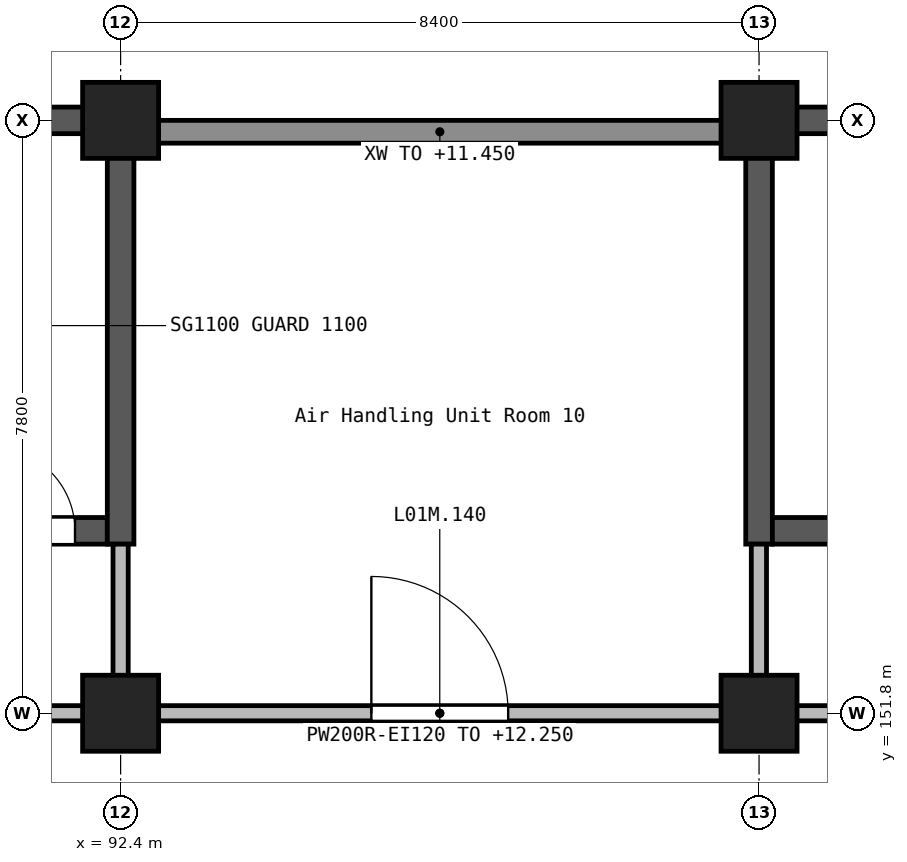
"""IFC4 building model, lengths in metres.
Left out: names, types, materials, properties, quantities, classifications, styles, units other than length and angle.
Written with IfcOpenShell. Run it as: python <this file> out.ifc"""

import sys

from ifc_helpers import new_model, si_unit, direction, frame, frame_2d, origin, origin_2d, place, context, subcontext, project, spatial, rectangle, extrude, element, fill, save


model = new_model("IFC4")
c1 = context("Model", 3, precision=1e-05, world=origin(), true_north=direction((0.0, 1.0)))
c2 = subcontext(c1, "Body", "Model", "MODEL_VIEW")
j1 = project(units=[si_unit("LENGTHUNIT", "METRE"), si_unit("PLANEANGLEUNIT", "RADIAN")], contexts=[c1])
p1 = place(None, origin())
s1 = spatial("IfcSite", under=j1, at=p1, CompositionType="ELEMENT")
p2 = place(p1, origin())
s2 = spatial("IfcBuilding", under=s1, at=p2, CompositionType="ELEMENT")
p3 = place(p2, frame((0.0, 0.0, 9.9)))
s3 = spatial("IfcBuildingStorey", under=s2, at=p3, CompositionType="ELEMENT", Elevation=9.9)
for number, where, z_axis, x_axis in (
    (1, (92.4, 151.8, 0.0), (0.0, 0.0, 1.0), (1.0, 0.0, 0.0)),
    (2, (92.4, 159.6, 0.0), (0.0, 0.0, 1.0), (1.0, 0.0, 0.0)),
    (3, (100.8, 151.8, 0.0), (0.0, 0.0, 1.0), (1.0, 0.0, 0.0)),
    (4, (100.8, 159.6, 0.0), (0.0, 0.0, 1.0), (1.0, 0.0, 0.0)),
):
    element("IfcColumn", number, at=place(p3, frame(where, z_axis=z_axis, x_axis=x_axis)), inside=s3, PredefinedType="COLUMN", context=c2, shape_type="SweptSolid", body=[
        extrude(rectangle(XDim=1.0, YDim=1.0, at=origin_2d()), origin(), (0.0, 0.0, 1.0), 2.7),
    ])
p4 = place(p3, frame((83.825, 159.6, 0.0), z_axis=(0.0, 0.0, 1.0), x_axis=(1.0, 0.0, 0.0)))
e5 = element("IfcWall", 5, at=p4, inside=s3, PredefinedType="SHEAR", context=c2, shape_type="SweptSolid", body=[
    extrude(rectangle(XDim=8.4, YDim=0.35, at=frame_2d((4.2, 0.0))), origin(), (0.0, 0.0, 1.0), 2.7),
])
p5 = place(p3, frame((84.175, 154.2, 0.0), z_axis=(0.0, 0.0, 1.0), x_axis=(1.0, 0.0, 0.0)))
e6 = element("IfcWall", 6, at=p5, inside=s3, PredefinedType="SHEAR", context=c2, shape_type="SweptSolid", body=[
    extrude(rectangle(XDim=8.05, YDim=0.35, at=frame_2d((4.025, 0.0))), origin(), (0.0, 0.0, 1.0), 2.7),
])
p6 = place(p5, frame((6.525, 0.0, 0.0)))
e7 = element("IfcOpeningElement", 7, at=p6, cuts=e6, PredefinedType="OPENING", context=c2, shape_type="SweptSolid", body=[
    extrude(rectangle(XDim=1.1, YDim=2.1, at=frame_2d((0.55, 1.05))), frame((0.0, 0.185, 0.0), z_axis=(0.0, -1.0, 0.0), x_axis=(1.0, 0.0, 0.0)), (0.0, 0.0, 1.0), 0.37),
])
p7 = place(p3, frame((92.4, 154.025, 0.0), z_axis=(0.0, 0.0, 1.0), x_axis=(0.0, 1.0, 0.0)))
e8 = element("IfcWall", 8, at=p7, inside=s3, PredefinedType="SHEAR", context=c2, shape_type="SweptSolid", body=[
    extrude(rectangle(XDim=5.75, YDim=0.35, at=frame_2d((2.875, 0.0))), origin(), (0.0, 0.0, 1.0), 2.7),
])
p8 = place(p3, frame((100.625, 159.6, 0.0), z_axis=(0.0, 0.0, 1.0), x_axis=(1.0, 0.0, 0.0)))
e9 = element("IfcWall", 9, at=p8, inside=s3, PredefinedType="SHEAR", context=c2, shape_type="SweptSolid", body=[
    extrude(rectangle(XDim=8.4, YDim=0.35, at=frame_2d((4.2, 0.0))), origin(), (0.0, 0.0, 1.0), 2.7),
])
p9 = place(p3, frame((100.8, 154.025, 0.0), z_axis=(0.0, 0.0, 1.0), x_axis=(0.0, 1.0, 0.0)))
e10 = element("IfcWall", 10, at=p9, inside=s3, PredefinedType="SHEAR", context=c2, shape_type="SweptSolid", body=[
    extrude(rectangle(XDim=5.4, YDim=0.35, at=frame_2d((2.7, 0.0))), origin(), (0.0, 0.0, 1.0), 2.7),
])
p10 = place(p3, frame((100.975, 154.2, 0.0), z_axis=(0.0, 0.0, 1.0), x_axis=(1.0, 0.0, 0.0)))
e11 = element("IfcWall", 11, at=p10, inside=s3, PredefinedType="SHEAR", context=c2, shape_type="SweptSolid", body=[
    extrude(rectangle(XDim=8.05, YDim=0.35, at=frame_2d((4.025, 0.0))), origin(), (0.0, 0.0, 1.0), 2.7),
])
p11 = place(p10, frame((6.525, 0.0, 0.0)))
e12 = element("IfcOpeningElement", 12, at=p11, cuts=e11, PredefinedType="OPENING", context=c2, shape_type="SweptSolid", body=[
    extrude(rectangle(XDim=1.1, YDim=2.1, at=frame_2d((0.55, 1.05))), frame((0.0, 0.185, 0.0), z_axis=(0.0, -1.0, 0.0), x_axis=(1.0, 0.0, 0.0)), (0.0, 0.0, 1.0), 0.37),
])
p12 = place(p3, frame((100.35, 159.45, 0.0), z_axis=(0.0, 0.0, 1.0), x_axis=(-1.0, 0.0, 0.0)))
e13 = element("IfcWall", 13, at=p12, inside=s3, PredefinedType="STANDARD", context=c2, shape_type="SweptSolid", body=[
    extrude(rectangle(XDim=7.5, YDim=0.3, at=frame_2d((3.75, 0.0))), origin(), (0.0, 0.0, 1.0), 1.55),
])
p13 = place(p3, frame((108.75, 151.8, 0.0), z_axis=(0.0, 0.0, 1.0), x_axis=(-1.0, 0.0, 0.0)))
e14 = element("IfcWall", 14, at=p13, inside=s3, PredefinedType="SOLIDWALL", context=c2, shape_type="SweptSolid", body=[
    extrude(rectangle(XDim=7.5, YDim=0.2, at=frame_2d((3.75, 0.0))), origin(), (0.0, 0.0, 1.0), 2.35),
])
p14 = place(p13, frame((3.2, 0.0, 0.0)))
e15 = element("IfcOpeningElement", 15, at=p14, cuts=e14, PredefinedType="OPENING", context=c2, shape_type="SweptSolid", body=[
    extrude(rectangle(XDim=1.1, YDim=2.1, at=frame_2d((0.55, 1.05))), frame((0.0, 0.11, 0.0), z_axis=(0.0, -1.0, 0.0), x_axis=(1.0, 0.0, 0.0)), (0.0, 0.0, 1.0), 0.22),
])
p15 = place(p3, frame((84.45, 151.8, 0.0), z_axis=(0.0, 0.0, 1.0), x_axis=(1.0, 0.0, 0.0)))
e16 = element("IfcWall", 16, at=p15, inside=s3, PredefinedType="SOLIDWALL", context=c2, shape_type="SweptSolid", body=[
    extrude(rectangle(XDim=7.5, YDim=0.2, at=frame_2d((3.75, 0.0))), origin(), (0.0, 0.0, 1.0), 2.35),
])
p16 = place(p15, frame((3.2, 0.0, 0.0)))
e17 = element("IfcOpeningElement", 17, at=p16, cuts=e16, PredefinedType="OPENING", context=c2, shape_type="SweptSolid", body=[
    extrude(rectangle(XDim=1.1, YDim=2.1, at=frame_2d((0.55, 1.05))), frame((0.0, 0.11, 0.0), z_axis=(0.0, -1.0, 0.0), x_axis=(1.0, 0.0, 0.0)), (0.0, 0.0, 1.0), 0.22),
])
p17 = place(p3, frame((92.85, 151.8, 0.0), z_axis=(0.0, 0.0, 1.0), x_axis=(1.0, 0.0, 0.0)))
e18 = element("IfcWall", 18, at=p17, inside=s3, PredefinedType="SOLIDWALL", context=c2, shape_type="SweptSolid", body=[
    extrude(rectangle(XDim=7.5, YDim=0.2, at=frame_2d((3.75, 0.0))), origin(), (0.0, 0.0, 1.0), 2.35),
])
p18 = place(p17, frame((2.849, 0.0, 0.0)))
e19 = element("IfcOpeningElement", 19, at=p18, cuts=e18, PredefinedType="OPENING", context=c2, shape_type="SweptSolid", body=[
    extrude(rectangle(XDim=1.8, YDim=2.1, at=frame_2d((0.9, 1.05))), frame((0.0, 0.11, 0.0), z_axis=(0.0, -1.0, 0.0), x_axis=(1.0, 0.0, 0.0)), (0.0, 0.0, 1.0), 0.22),
])
for number, where, z_axis, x_axis in (
    (20, (92.4, 152.25, 0.0), (0.0, 0.0, 1.0), (0.0, 1.0, 0.0)),
    (21, (100.798, 152.25, 0.0), (0.0, 0.0, 1.0), (0.0, 1.0, 0.0)),
):
    element("IfcWall", number, at=place(p3, frame(where, z_axis=z_axis, x_axis=x_axis)), inside=s3, PredefinedType="SOLIDWALL", context=c2, shape_type="SweptSolid", body=[
        extrude(rectangle(XDim=1.775, YDim=0.2, at=frame_2d((0.887, 0.0))), origin(), (0.0, 0.0, 1.0), 2.35),
    ])
p19 = place(p6, origin())
e22 = element("IfcDoor", 22, at=p19, inside=s3, OperationType="SINGLE_SWING_RIGHT", PredefinedType="DOOR", context=c2, shape_type="SweptSolid", body=[
    extrude(rectangle(XDim=1.1, YDim=2.1, at=frame_2d((0.55, 1.05))), frame((0.0, 0.025, 0.0), z_axis=(0.0, -1.0, 0.0), x_axis=(1.0, 0.0, 0.0)), (0.0, 0.0, 1.0), 0.05),
])
fill(e7, e22)
p20 = place(p18, origin())
e23 = element("IfcDoor", 23, at=p20, inside=s3, OperationType="DOUBLE_DOOR_SINGLE_SWING", PredefinedType="DOOR", context=c2, shape_type="SweptSolid", body=[
    extrude(rectangle(XDim=1.8, YDim=2.1, at=frame_2d((0.9, 1.05))), frame((0.0, 0.025, 0.0), z_axis=(0.0, -1.0, 0.0), x_axis=(1.0, 0.0, 0.0)), (0.0, 0.0, 1.0), 0.05),
])
fill(e19, e23)
save(model, sys.argv[1])
